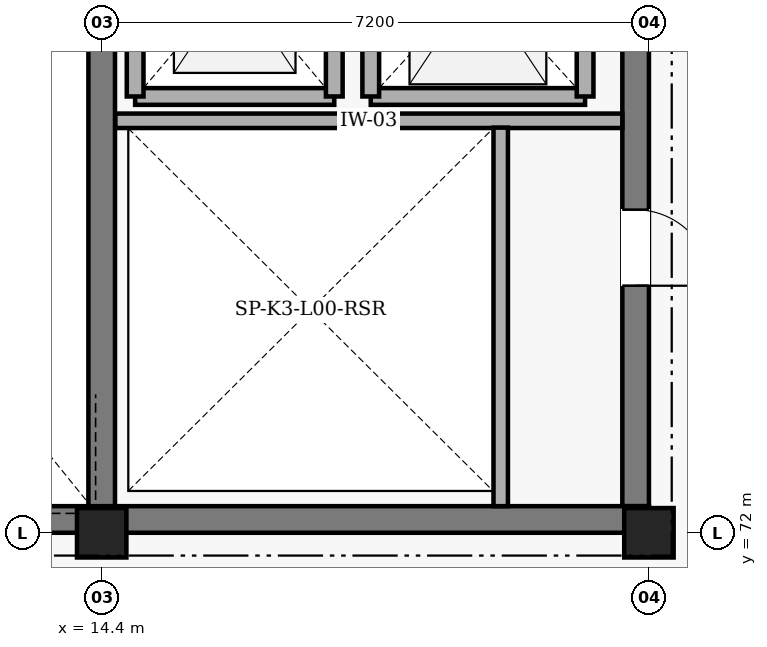
"""IFC4 building model, lengths in metres.
Left out: names, types, materials, properties, quantities, classifications, styles, units other than length and angle.
Written with IfcOpenShell. Run it as: python <this file> out.ifc"""

import sys

from ifc_helpers import new_model, si_unit, direction, frame, frame_2d, origin, origin_2d, place, context, subcontext, project, spatial, rectangle, extrude, element, fill, save


model = new_model("IFC4")
c1 = context("Model", 3, precision=1e-05, world=origin(), true_north=direction((0.0, 1.0)))
c2 = subcontext(c1, "Body", "Model", "MODEL_VIEW")
j1 = project(units=[si_unit("LENGTHUNIT", "METRE"), si_unit("PLANEANGLEUNIT", "RADIAN")], contexts=[c1])
p1 = place(None, origin())
s1 = spatial("IfcSite", under=j1, at=p1, CompositionType="ELEMENT")
p2 = place(p1, origin())
s2 = spatial("IfcBuilding", under=s1, at=p2, CompositionType="ELEMENT")
p3 = place(p2, origin())
s3 = spatial("IfcBuildingStorey", under=s2, at=p3, CompositionType="ELEMENT", Elevation=0.0)
p4 = place(p3, frame((21.425, 86.05, 0.0), z_axis=(0.0, 0.0, 1.0), x_axis=(0.0, -1.0, 0.0)))
e1 = element("IfcWall", 1, at=p4, inside=s3, PredefinedType="SHEAR", context=c2, shape_type="SweptSolid", body=[
    extrude(rectangle(XDim=13.7, YDim=0.35, at=frame_2d((6.85, 0.0))), origin(), (0.0, 0.0, 1.0), 5.4),
])
p5 = place(p4, frame((9.8, 0.0, 0.0)))
e2 = element("IfcOpeningElement", 2, at=p5, cuts=e1, PredefinedType="OPENING", context=c2, shape_type="SweptSolid", body=[
    extrude(rectangle(XDim=1.0, YDim=2.15, at=frame_2d((0.5, 1.075))), frame((0.0, 0.185, 0.0), z_axis=(0.0, -1.0, 0.0), x_axis=(1.0, 0.0, 0.0)), (0.0, 0.0, 1.0), 0.37),
])
p6 = place(p4, frame((2.3, 0.0, 0.0)))
e3 = element("IfcOpeningElement", 3, at=p6, cuts=e1, PredefinedType="OPENING", context=c2, shape_type="SweptSolid", body=[
    extrude(rectangle(XDim=1.25, YDim=2.2, at=frame_2d((0.625, 1.1))), frame((0.0, 0.185, 0.0), z_axis=(0.0, -1.0, 0.0), x_axis=(1.0, 0.0, 0.0)), (0.0, 0.0, 1.0), 0.37),
])
p7 = place(p3, frame((21.6, 72.175, 0.0), z_axis=(0.0, 0.0, 1.0), x_axis=(-1.0, 0.0, 0.0)))
e4 = element("IfcWall", 4, at=p7, inside=s3, PredefinedType="SHEAR", context=c2, shape_type="SweptSolid", body=[
    extrude(rectangle(XDim=14.4, YDim=0.35, at=frame_2d((7.2, 0.0))), origin(), (0.0, 0.0, 1.0), 5.4),
])
p8 = place(p3, frame((14.4, 86.05, 0.0), z_axis=(0.0, 0.0, 1.0), x_axis=(0.0, -1.0, 0.0)))
e5 = element("IfcWall", 5, at=p8, inside=s3, PredefinedType="SHEAR", context=c2, shape_type="SweptSolid", body=[
    extrude(rectangle(XDim=13.7, YDim=0.35, at=frame_2d((6.85, 0.0))), origin(), (0.0, 0.0, 1.0), 5.4),
])
p9 = place(p8, frame((1.5, 0.0, 0.0)))
e6 = element("IfcOpeningElement", 6, at=p9, cuts=e5, PredefinedType="OPENING", context=c2, shape_type="SweptSolid", body=[
    extrude(rectangle(XDim=1.25, YDim=2.2, at=frame_2d((0.625, 1.1))), frame((0.0, 0.185, 0.0), z_axis=(0.0, -1.0, 0.0), x_axis=(1.0, 0.0, 0.0)), (0.0, 0.0, 1.0), 0.37),
])
for number, where, z_axis, x_axis in (
    (7, (14.4, 72.0, 0.0), (0.0, 0.0, 1.0), (1.0, 0.0, 0.0)),
    (8, (21.6, 72.0, 0.0), (0.0, 0.0, 1.0), (1.0, 0.0, 0.0)),
):
    element("IfcColumn", number, at=place(p3, frame(where, z_axis=z_axis, x_axis=x_axis)), inside=s3, PredefinedType="COLUMN", context=c2, shape_type="SweptSolid", body=[
        extrude(rectangle(XDim=0.65, YDim=0.65, at=origin_2d()), origin(), (0.0, 0.0, 1.0), 5.12),
    ])
p10 = place(p3, frame((14.58, 77.42, 0.0), z_axis=(0.0, 0.0, 1.0), x_axis=(1.0, 0.0, 0.0)))
e9 = element("IfcWall", 9, at=p10, inside=s3, PredefinedType="PARTITIONING", context=c2, shape_type="SweptSolid", body=[
    extrude(rectangle(XDim=6.67, YDim=0.19, at=frame_2d((3.335, 0.0))), origin(), (0.0, 0.0, 1.0), 5.05),
])
p11 = place(p3, frame((19.65, 72.35, 0.0), z_axis=(0.0, 0.0, 1.0), x_axis=(0.0, 1.0, 0.0)))
e10 = element("IfcWall", 10, at=p11, inside=s3, PredefinedType="PARTITIONING", context=c2, shape_type="SweptSolid", body=[
    extrude(rectangle(XDim=4.98, YDim=0.19, at=frame_2d((2.49, 0.0))), origin(), (0.0, 0.0, 1.0), 5.05),
])
p12 = place(p3, frame((14.84, 77.74, 0.0), z_axis=(0.0, 0.0, 1.0), x_axis=(1.0, 0.0, 0.0)))
e11 = element("IfcWall", 11, at=p12, inside=s3, PredefinedType="PARTITIONING", context=c2, shape_type="SweptSolid", body=[
    extrude(rectangle(XDim=2.62, YDim=0.22, at=frame_2d((1.31, 0.0))), origin(), (0.0, 0.0, 1.0), 5.05),
])
for number, where, z_axis, x_axis in (
    (12, (14.84, 77.74, 0.0), (0.0, 0.0, 1.0), (0.0, 1.0, 0.0)),
    (13, (17.46, 77.74, 0.0), (0.0, 0.0, 1.0), (0.0, 1.0, 0.0)),
):
    element("IfcWall", number, at=place(p3, frame(where, z_axis=z_axis, x_axis=x_axis)), inside=s3, PredefinedType="PARTITIONING", context=c2, shape_type="SweptSolid", body=[
        extrude(rectangle(XDim=3.0, YDim=0.22, at=frame_2d((1.5, 0.0))), origin(), (0.0, 0.0, 1.0), 5.05),
    ])
p13 = place(p3, frame((17.94, 77.74, 0.0), z_axis=(0.0, 0.0, 1.0), x_axis=(1.0, 0.0, 0.0)))
e14 = element("IfcWall", 14, at=p13, inside=s3, PredefinedType="PARTITIONING", context=c2, shape_type="SweptSolid", body=[
    extrude(rectangle(XDim=2.82, YDim=0.22, at=frame_2d((1.41, 0.0))), origin(), (0.0, 0.0, 1.0), 5.05),
])
for number, where, z_axis, x_axis in (
    (15, (17.94, 77.74, 0.0), (0.0, 0.0, 1.0), (0.0, 1.0, 0.0)),
    (16, (20.76, 77.74, 0.0), (0.0, 0.0, 1.0), (0.0, 1.0, 0.0)),
):
    element("IfcWall", number, at=place(p3, frame(where, z_axis=z_axis, x_axis=x_axis)), inside=s3, PredefinedType="PARTITIONING", context=c2, shape_type="SweptSolid", body=[
        extrude(rectangle(XDim=3.0, YDim=0.22, at=frame_2d((1.5, 0.0))), origin(), (0.0, 0.0, 1.0), 5.05),
    ])
p14 = place(p5, origin())
e17 = element("IfcDoor", 17, at=p14, inside=s3, OperationType="SINGLE_SWING_RIGHT", PredefinedType="DOOR", context=c2, shape_type="SweptSolid", body=[
    extrude(rectangle(XDim=1.0, YDim=2.15, at=frame_2d((0.5, 1.075))), frame((0.0, 0.025, 0.0), z_axis=(0.0, -1.0, 0.0), x_axis=(1.0, 0.0, 0.0)), (0.0, 0.0, 1.0), 0.05),
])
fill(e2, e17)
save(model, sys.argv[1])
